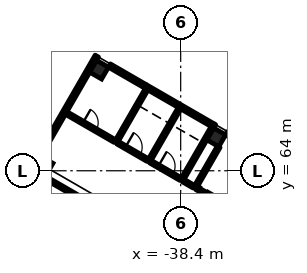
"""IFC4 building model, lengths in metres.
Left out: names, types, materials, properties, quantities, classifications, styles, units other than length and angle.
Written with IfcOpenShell. Run it as: python <this file> out.ifc"""

import sys

from ifc_helpers import new_model, si_unit, direction, frame, frame_2d, origin, origin_2d, place, context, subcontext, project, spatial, rectangle, extrude, element, fill, save


model = new_model("IFC4")
c1 = context("Model", 3, precision=1e-05, world=origin(), true_north=direction((0.0, 1.0)))
c2 = subcontext(c1, "Body", "Model", "MODEL_VIEW")
j1 = project(units=[si_unit("LENGTHUNIT", "METRE"), si_unit("PLANEANGLEUNIT", "RADIAN")], contexts=[c1])
p1 = place(None, origin())
s1 = spatial("IfcSite", under=j1, at=p1, CompositionType="ELEMENT")
p2 = place(p1, origin())
s2 = spatial("IfcBuilding", under=s1, at=p2, CompositionType="ELEMENT")
p3 = place(p2, frame((0.0, 0.0, 16.2)))
s3 = spatial("IfcBuildingStorey", under=s2, at=p3, CompositionType="ELEMENT", Elevation=16.2)
for number, where, z_axis, x_axis in (
    (1, (-36.06, 66.199, 0.0), (0.0, 0.0, 1.0), (-0.5, -0.866, 0.0)),
    (2, (-43.767, 70.649, 0.0), (0.0, 0.0, 1.0), (-0.5, -0.866, 0.0)),
    (3, (-47.417, 64.327, 0.0), (0.0, 0.0, 1.0), (-0.5, -0.866, 0.0)),
):
    element("IfcColumn", number, at=place(p3, frame(where, z_axis=z_axis, x_axis=x_axis)), inside=s3, PredefinedType="COLUMN", context=c2, shape_type="SweptSolid", body=[
        extrude(rectangle(XDim=0.9, YDim=0.9, at=origin_2d()), origin(), (0.0, 0.0, 1.0), 5.4),
    ])
p4 = place(p3, frame((-48.228, 64.073, 0.0), z_axis=(0.0, 0.0, 1.0), x_axis=(0.499999331568, 0.866025789703, 0.0)))
e4 = element("IfcWall", 4, at=p4, inside=s3, PredefinedType="SOLIDWALL", context=c2, shape_type="SweptSolid", body=[
    extrude(rectangle(XDim=8.625, YDim=0.25, at=frame_2d((4.312, 0.0))), origin(), (0.0, 0.0, 1.0), 5.0),
])
p5 = place(p3, frame((-35.383, 66.472, 0.0), z_axis=(0.0, 0.0, 1.0), x_axis=(0.866028165386, -0.499995216735, 0.0)))
e5 = element("IfcWall", 5, at=p5, inside=s3, PredefinedType="SOLIDWALL", context=c2, shape_type="SweptSolid", body=[
    extrude(rectangle(XDim=8.6, YDim=0.25, at=frame_2d((4.3, 0.0))), origin(), (0.0, 0.0, 1.0), 5.0),
])
p6 = place(p3, frame((-40.752, 69.572, 0.0), z_axis=(0.0, 0.0, 1.0), x_axis=(0.866009661879, -0.500027264788, 0.0)))
e6 = element("IfcWall", 6, at=p6, inside=s3, PredefinedType="SOLIDWALL", context=c2, shape_type="SweptSolid", body=[
    extrude(rectangle(XDim=5.2, YDim=0.25, at=frame_2d((2.6, 0.0))), origin(), (0.0, 0.0, 1.0), 5.0),
])
p7 = place(p3, frame((-43.09, 70.922, 0.0), z_axis=(0.0, 0.0, 1.0), x_axis=(0.866059108428, -0.4999416173, 0.0)))
e7 = element("IfcWall", 7, at=p7, inside=s3, PredefinedType="SOLIDWALL", context=c2, shape_type="SweptSolid", body=[
    extrude(rectangle(XDim=2.7, YDim=0.25, at=frame_2d((1.35, 0.0))), origin(), (0.0, 0.0, 1.0), 5.0),
])
p8 = place(p7, frame((0.45, 0.0, 0.9)))
e8 = element("IfcOpeningElement", 8, at=p8, cuts=e7, PredefinedType="OPENING", context=c2, shape_type="SweptSolid", body=[
    extrude(rectangle(XDim=2.0, YDim=1.8, at=frame_2d((1.0, 0.9))), frame((0.0, 0.135, 0.0), z_axis=(0.0, -1.0, 0.0), x_axis=(1.0, 0.0, 0.0)), (0.0, 0.0, 1.0), 0.27),
])
p9 = place(p3, frame((-36.249, 66.972, 0.0), z_axis=(0.0, 0.0, 1.0), x_axis=(0.865982457891, -0.500074377092, 0.0)))
e9 = element("IfcWall", 9, at=p9, inside=s3, PredefinedType="SOLIDWALL", context=c2, shape_type="SweptSolid", body=[
    extrude(rectangle(XDim=0.1, YDim=0.25, at=frame_2d((0.05, 0.0))), origin(), (0.0, 0.0, 1.0), 5.0),
])
p10 = place(p3, frame((-35.895, 65.584, 0.0), z_axis=(0.0, 0.0, 1.0), x_axis=(-0.500026960575, -0.86600983753, 0.0)))
e10 = element("IfcWall", 10, at=p10, inside=s3, PredefinedType="SOLIDWALL", context=c2, shape_type="SweptSolid", body=[
    extrude(rectangle(XDim=3.1, YDim=0.2, at=frame_2d((1.55, 0.0))), origin(), (0.0, 0.0, 1.0), 5.0),
])
p11 = place(p3, frame((-31.599, 59.524, 0.0), z_axis=(0.0, 0.0, 1.0), x_axis=(-0.866027239912, 0.49999681972, 0.0)))
e11 = element("IfcWall", 11, at=p11, inside=s3, PredefinedType="SOLIDWALL", context=c2, shape_type="SweptSolid", body=[
    extrude(rectangle(XDim=6.65, YDim=0.2, at=frame_2d((3.325, 0.0))), origin(), (0.0, 0.0, 1.0), 5.0),
])
for number, where, z_axis, x_axis in (
    (12, (-36.311, 66.864, 0.0), (0.0, 0.0, 1.0), (-0.5, -0.866, 0.0)),
    (13, (-38.476, 68.114, 0.0), (0.0, 0.0, 1.0), (-0.5, -0.866, 0.0)),
    (14, (-40.641, 69.364, 0.0), (0.0, 0.0, 1.0), (-0.5, -0.866, 0.0)),
):
    element("IfcWall", number, at=place(p3, frame(where, z_axis=z_axis, x_axis=x_axis)), inside=s3, PredefinedType="SOLIDWALL", context=c2, shape_type="SweptSolid", body=[
        extrude(rectangle(XDim=4.0, YDim=0.2, at=frame_2d((2.0, 0.0))), origin(), (0.0, 0.0, 1.0), 5.0),
    ])
p12 = place(p3, frame((-40.389, 64.599, 0.0), z_axis=(0.0, 0.0, 1.0), x_axis=(0.86602648383, -0.499998129301, 0.0)))
e15 = element("IfcWall", 15, at=p12, inside=s3, PredefinedType="SOLIDWALL", context=c2, shape_type="SweptSolid", body=[
    extrude(rectangle(XDim=2.3, YDim=0.2, at=frame_2d((1.15, 0.0))), origin(), (0.0, 0.0, 1.0), 5.0),
])
p13 = place(p12, frame((0.6, 0.0, 0.0)))
e16 = element("IfcOpeningElement", 16, at=p13, cuts=e15, PredefinedType="OPENING", context=c2, shape_type="SweptSolid", body=[
    extrude(rectangle(XDim=1.1, YDim=2.1, at=frame_2d((0.55, 1.05))), frame((0.0, 0.11, 0.0), z_axis=(0.0, -1.0, 0.0), x_axis=(1.0, 0.0, 0.0)), (0.0, 0.0, 1.0), 0.22),
])
p14 = place(p3, frame((-42.554, 65.849, 0.0), z_axis=(0.0, 0.0, 1.0), x_axis=(0.86602648383, -0.499998129301, 0.0)))
e17 = element("IfcWall", 17, at=p14, inside=s3, PredefinedType="SOLIDWALL", context=c2, shape_type="SweptSolid", body=[
    extrude(rectangle(XDim=2.3, YDim=0.2, at=frame_2d((1.15, 0.0))), origin(), (0.0, 0.0, 1.0), 5.0),
])
p15 = place(p14, frame((0.6, 0.0, 0.0)))
e18 = element("IfcOpeningElement", 18, at=p15, cuts=e17, PredefinedType="OPENING", context=c2, shape_type="SweptSolid", body=[
    extrude(rectangle(XDim=1.1, YDim=2.1, at=frame_2d((0.55, 1.05))), frame((0.0, 0.11, 0.0), z_axis=(0.0, -1.0, 0.0), x_axis=(1.0, 0.0, 0.0)), (0.0, 0.0, 1.0), 0.22),
])
p16 = place(p3, frame((-45.932, 67.799, 0.0), z_axis=(0.0, 0.0, 1.0), x_axis=(0.866029545028, -0.499992827086, 0.0)))
e19 = element("IfcWall", 19, at=p16, inside=s3, PredefinedType="PARTITIONING", context=c2, shape_type="SweptSolid", body=[
    extrude(rectangle(XDim=3.7, YDim=0.2, at=frame_2d((1.85, 0.0))), origin(), (0.0, 0.0, 1.0), 4.1),
])
p17 = place(p16, frame((1.275, 0.0, 0.0)))
e20 = element("IfcOpeningElement", 20, at=p17, cuts=e19, PredefinedType="OPENING", context=c2, shape_type="SweptSolid", body=[
    extrude(rectangle(XDim=1.0, YDim=2.1, at=frame_2d((0.5, 1.05))), frame((0.0, 0.11, 0.0), z_axis=(0.0, -1.0, 0.0), x_axis=(1.0, 0.0, 0.0)), (0.0, 0.0, 1.0), 0.22),
])
p18 = place(p3, frame((-37.531, 62.949, 0.0), z_axis=(0.0, 0.0, 1.0), x_axis=(-0.866094119867, 0.499880961361, 0.0)))
e21 = element("IfcWall", 21, at=p18, inside=s3, PredefinedType="PARTITIONING", context=c2, shape_type="SweptSolid", body=[
    extrude(rectangle(XDim=0.8, YDim=0.2, at=frame_2d((0.4, 0.0))), origin(), (0.0, 0.0, 1.0), 4.1),
])
p19 = place(p3, frame((-6.983, 40.26, 0.0), z_axis=(0.0, 0.0, 1.0), x_axis=(-0.866024244032, 0.500002008745, 0.0)))
e22 = element("IfcWall", 22, at=p19, inside=s3, PredefinedType="PARTITIONING", context=c2, shape_type="SweptSolid", body=[
    extrude(rectangle(XDim=47.5, YDim=0.2, at=frame_2d((23.75, 0.0))), origin(), (0.0, 0.0, 1.0), 4.1),
])
p20 = place(p8, origin())
e23 = element("IfcWindow", 23, at=p20, inside=s3, PartitioningType="SINGLE_PANEL", PredefinedType="WINDOW", context=c2, shape_type="SweptSolid", body=[
    extrude(rectangle(XDim=2.0, YDim=1.8, at=frame_2d((1.0, 0.9))), frame((0.0, 0.03, 0.0), z_axis=(0.0, -1.0, 0.0), x_axis=(1.0, 0.0, 0.0)), (0.0, 0.0, 1.0), 0.06),
])
fill(e8, e23)
p21 = place(p13, origin())
e24 = element("IfcDoor", 24, at=p21, inside=s3, OperationType="DOUBLE_DOOR_SLIDING", PredefinedType="DOOR", context=c2, shape_type="SweptSolid", body=[
    extrude(rectangle(XDim=1.1, YDim=2.1, at=frame_2d((0.55, 1.05))), frame((0.0, 0.025, 0.0), z_axis=(0.0, -1.0, 0.0), x_axis=(1.0, 0.0, 0.0)), (0.0, 0.0, 1.0), 0.05),
])
fill(e16, e24)
p22 = place(p15, origin())
e25 = element("IfcDoor", 25, at=p22, inside=s3, OperationType="DOUBLE_DOOR_SLIDING", PredefinedType="DOOR", context=c2, shape_type="SweptSolid", body=[
    extrude(rectangle(XDim=1.1, YDim=2.1, at=frame_2d((0.55, 1.05))), frame((0.0, 0.025, 0.0), z_axis=(0.0, -1.0, 0.0), x_axis=(1.0, 0.0, 0.0)), (0.0, 0.0, 1.0), 0.05),
])
fill(e18, e25)
p23 = place(p17, origin())
e26 = element("IfcDoor", 26, at=p23, inside=s3, OperationType="SINGLE_SWING_LEFT", PredefinedType="DOOR", context=c2, shape_type="SweptSolid", body=[
    extrude(rectangle(XDim=1.0, YDim=2.1, at=frame_2d((0.5, 1.05))), frame((0.0, 0.025, 0.0), z_axis=(0.0, -1.0, 0.0), x_axis=(1.0, 0.0, 0.0)), (0.0, 0.0, 1.0), 0.05),
])
fill(e20, e26)
save(model, sys.argv[1])
